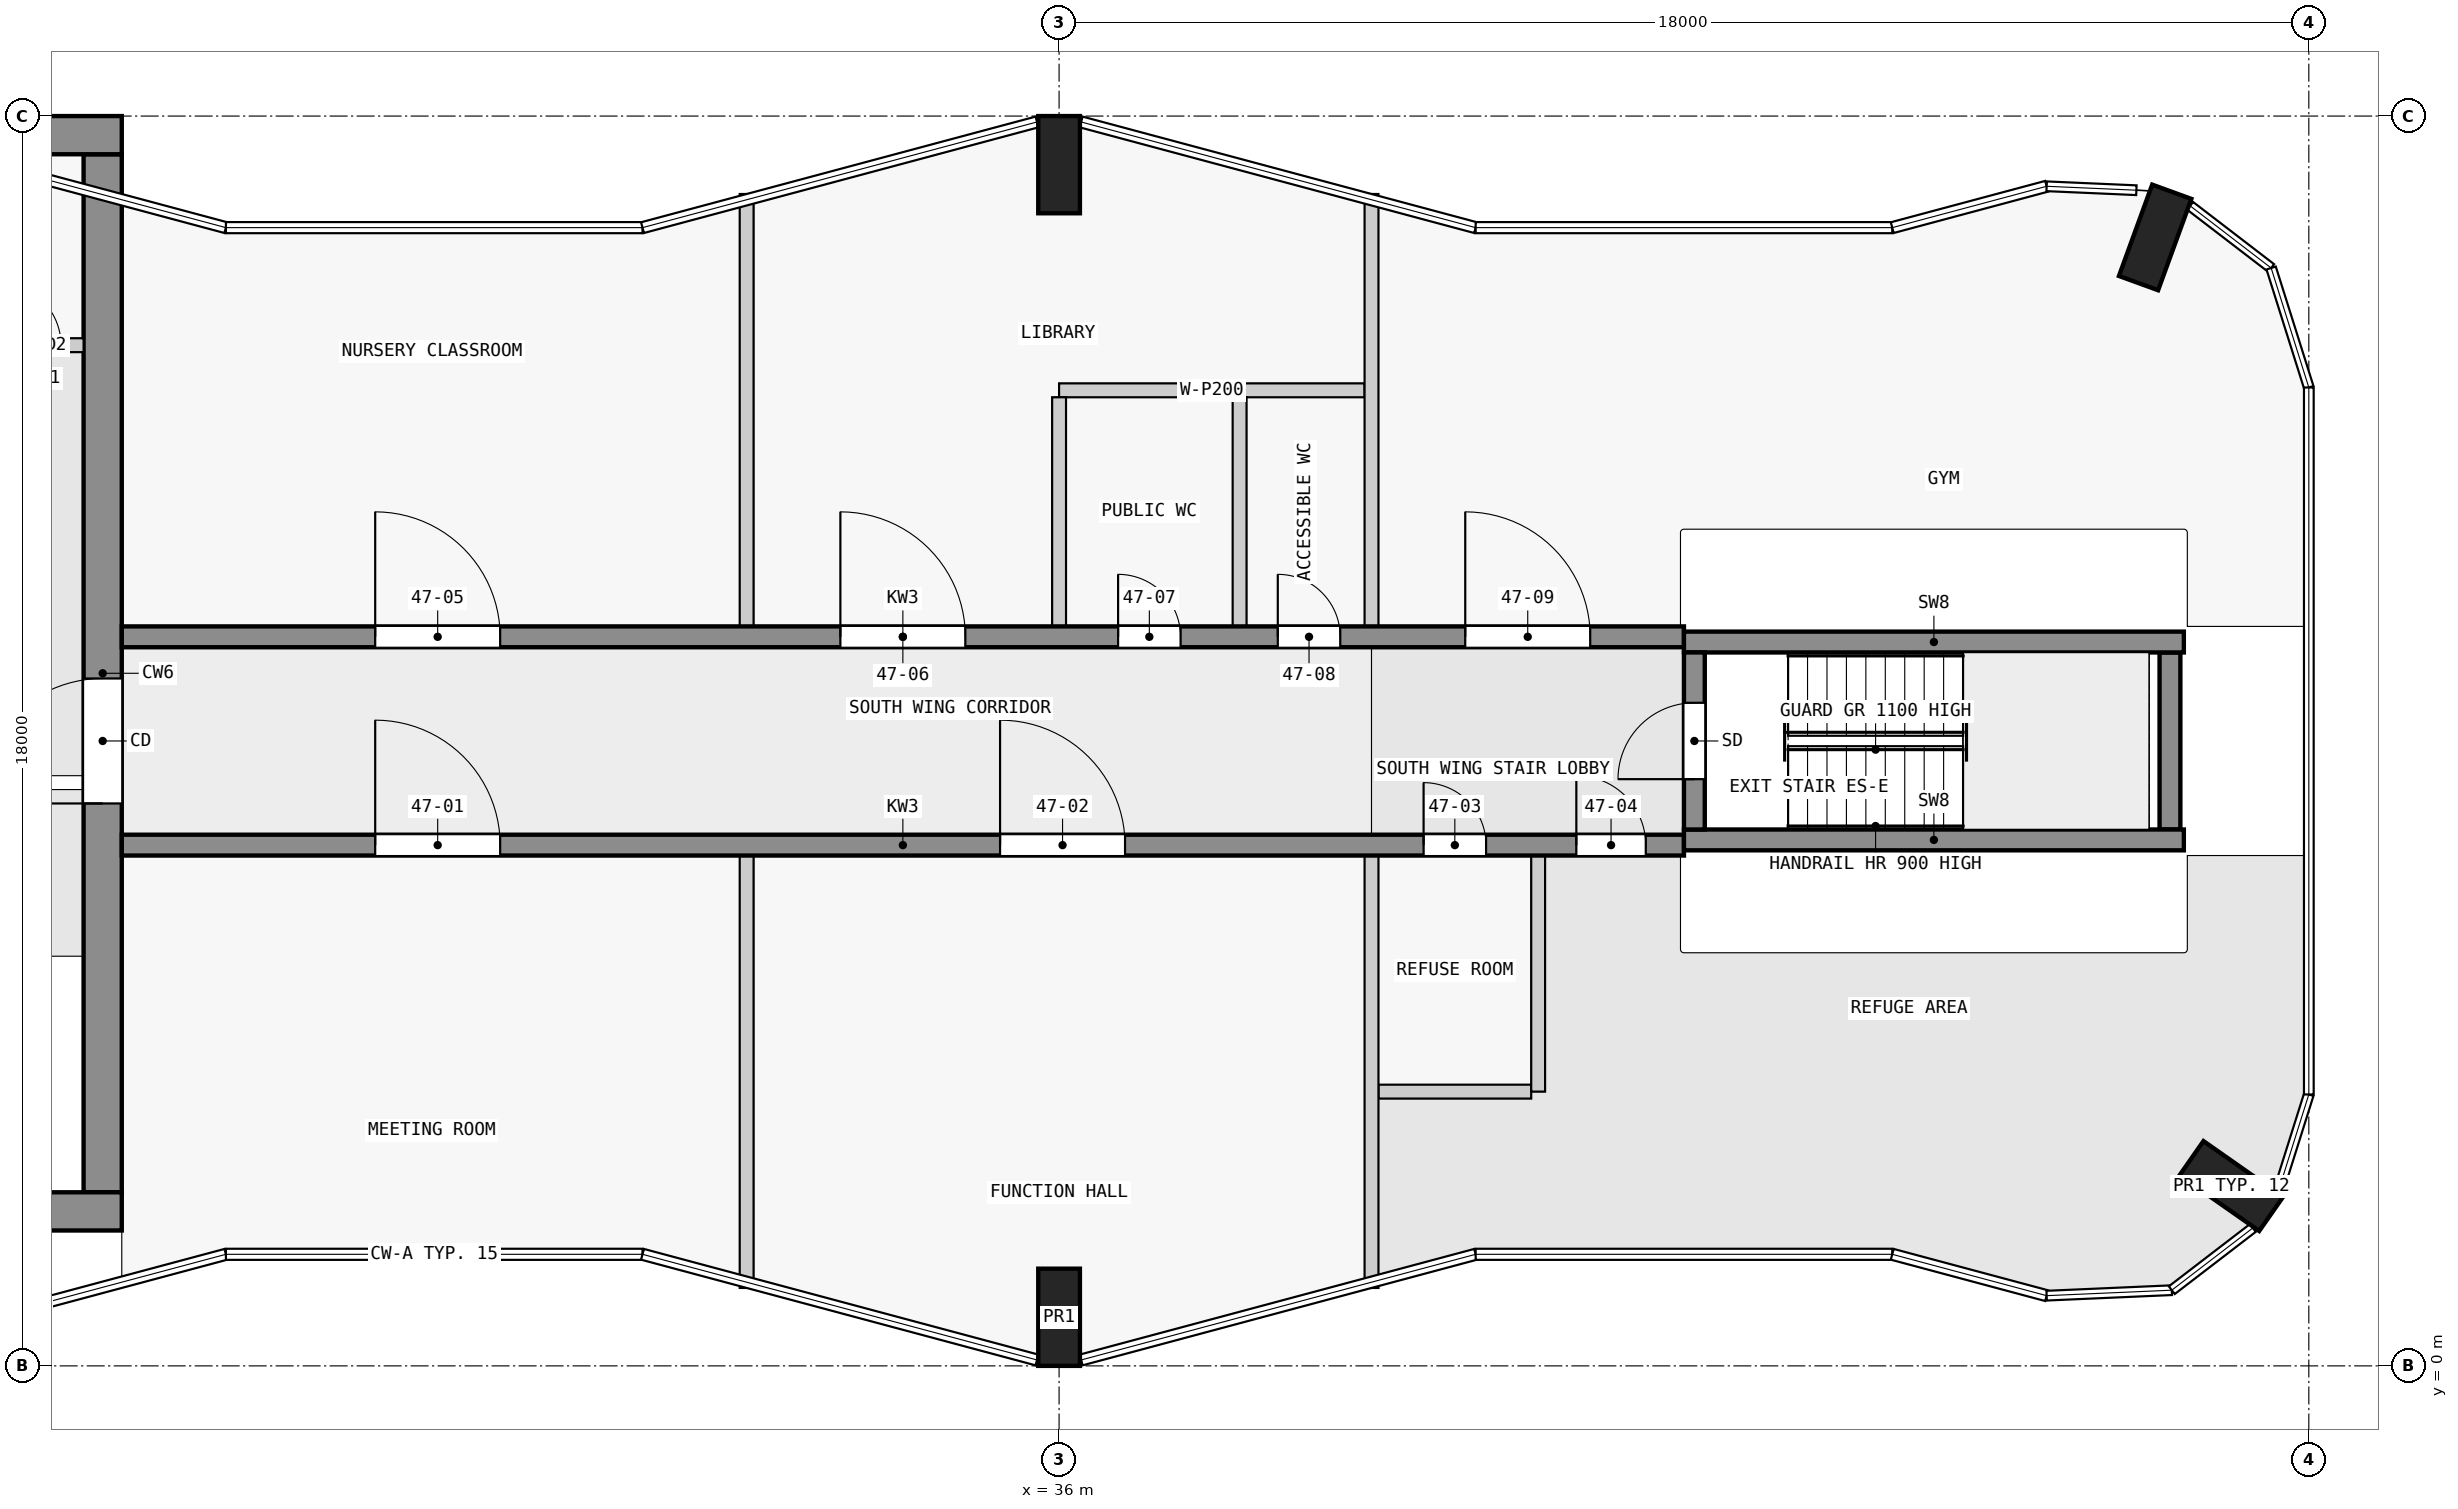
"""IFC4 building model, lengths in metres.
Left out: names, types, materials, properties, quantities, classifications, styles, units other than length and angle.
Written with IfcOpenShell. Run it as: python <this file> out.ifc"""

import sys

from ifc_helpers import new_model, si_unit, direction, frame, frame_2d, origin, origin_2d, place, context, subcontext, project, spatial, rectangle, extrude, element, fill, save


model = new_model("IFC4")
c1 = context("Model", 3, precision=1e-05, world=origin(), true_north=direction((0.0, 1.0)))
c2 = subcontext(c1, "Body", "Model", "MODEL_VIEW")
j1 = project(units=[si_unit("LENGTHUNIT", "METRE"), si_unit("PLANEANGLEUNIT", "RADIAN")], contexts=[c1])
p1 = place(None, origin())
s1 = spatial("IfcSite", under=j1, at=p1, CompositionType="ELEMENT")
p2 = place(p1, origin())
s2 = spatial("IfcBuilding", under=s1, at=p2, CompositionType="ELEMENT")
p3 = place(p2, frame((0.0, 0.0, 181.4)))
s3 = spatial("IfcBuildingStorey", under=s2, at=p3, CompositionType="ELEMENT", Elevation=181.4)
for number, where, z_axis, x_axis in (
    (1, (36.0, 0.7, 0.0), (0.0, 0.0, 1.0), (1.0, 0.0, 0.0)),
    (2, (52.884, 2.59, 0.0), (0.0, 0.0, 1.0), (0.574, 0.819, 0.0)),
    (3, (51.787, 16.252, 0.0), (0.0, 0.0, 1.0), (-0.94, 0.342, 0.0)),
    (4, (36.0, 17.3, 0.0), (0.0, 0.0, 1.0), (1.0, 0.0, 0.0)),
):
    element("IfcColumn", number, at=place(p3, frame(where, z_axis=z_axis, x_axis=x_axis)), inside=s3, PredefinedType="COLUMN", context=c2, shape_type="SweptSolid", body=[
        extrude(rectangle(XDim=0.6, YDim=1.4, at=origin_2d()), origin(), (0.0, 0.0, 1.0), 3.5),
    ])
p4 = place(p3, frame((1.75, 2.225, 0.0), z_axis=(0.0, 0.0, 1.0), x_axis=(1.0, 0.0, 0.0)))
e5 = element("IfcWall", 5, at=p4, inside=s3, PredefinedType="SHEAR", context=c2, shape_type="SweptSolid", body=[
    extrude(rectangle(XDim=20.75, YDim=0.55, at=frame_2d((10.375, 0.0))), origin(), (0.0, 0.0, 1.0), 3.2),
])
p5 = place(p3, frame((1.38, 17.725, 0.0), z_axis=(0.0, 0.0, 1.0), x_axis=(1.0, 0.0, 0.0)))
e6 = element("IfcWall", 6, at=p5, inside=s3, PredefinedType="SHEAR", context=c2, shape_type="SweptSolid", body=[
    extrude(rectangle(XDim=21.12, YDim=0.55, at=frame_2d((10.56, 0.0))), origin(), (0.0, 0.0, 1.0), 3.2),
])
p6 = place(p5, frame((6.35, 0.0, 0.0)))
e7 = element("IfcOpeningElement", 7, at=p6, cuts=e6, PredefinedType="OPENING", context=c2, shape_type="SweptSolid", body=[
    extrude(rectangle(XDim=1.8, YDim=2.1, at=frame_2d((0.9, 1.05))), frame((0.0, 0.285, 0.0), z_axis=(0.0, -1.0, 0.0), x_axis=(1.0, 0.0, 0.0)), (0.0, 0.0, 1.0), 0.57),
])
p7 = place(p3, frame((22.225, 2.5, 0.0), z_axis=(0.0, 0.0, 1.0), x_axis=(0.0, 1.0, 0.0)))
e8 = element("IfcWall", 8, at=p7, inside=s3, PredefinedType="SHEAR", context=c2, shape_type="SweptSolid", body=[
    extrude(rectangle(XDim=14.95, YDim=0.55, at=frame_2d((7.475, 0.0))), origin(), (0.0, 0.0, 1.0), 3.2),
])
p8 = place(p7, frame((5.6, 0.0, 0.0)))
e9 = element("IfcOpeningElement", 9, at=p8, cuts=e8, PredefinedType="OPENING", context=c2, shape_type="SweptSolid", body=[
    extrude(rectangle(XDim=1.8, YDim=2.1, at=frame_2d((0.9, 1.05))), frame((0.0, 0.285, 0.0), z_axis=(0.0, -1.0, 0.0), x_axis=(1.0, 0.0, 0.0)), (0.0, 0.0, 1.0), 0.57),
])
p9 = place(p3, frame((45.15, 7.725, 0.0), z_axis=(0.0, 0.0, 1.0), x_axis=(0.0, 1.0, 0.0)))
e10 = element("IfcWall", 10, at=p9, inside=s3, PredefinedType="SHEAR", context=c2, shape_type="SweptSolid", body=[
    extrude(rectangle(XDim=2.55, YDim=0.3, at=frame_2d((1.275, 0.0))), origin(), (0.0, 0.0, 1.0), 3.5),
])
p10 = place(p9, frame((0.725, 0.0, 0.0)))
e11 = element("IfcOpeningElement", 11, at=p10, cuts=e10, PredefinedType="OPENING", context=c2, shape_type="SweptSolid", body=[
    extrude(rectangle(XDim=1.1, YDim=2.1, at=frame_2d((0.55, 1.05))), frame((0.0, 0.16, 0.0), z_axis=(0.0, -1.0, 0.0), x_axis=(1.0, 0.0, 0.0)), (0.0, 0.0, 1.0), 0.32),
])
p11 = place(p3, frame((52.0, 7.725, 0.0), z_axis=(0.0, 0.0, 1.0), x_axis=(0.0, 1.0, 0.0)))
e12 = element("IfcWall", 12, at=p11, inside=s3, PredefinedType="SHEAR", context=c2, shape_type="SweptSolid", body=[
    extrude(rectangle(XDim=2.55, YDim=0.3, at=frame_2d((1.275, 0.0))), origin(), (0.0, 0.0, 1.0), 3.5),
])
for number, where, z_axis, x_axis in (
    (13, (45.0, 7.575, 0.0), (0.0, 0.0, 1.0), (1.0, 0.0, 0.0)),
    (14, (45.0, 10.425, 0.0), (0.0, 0.0, 1.0), (1.0, 0.0, 0.0)),
):
    element("IfcWall", number, at=place(p3, frame(where, z_axis=z_axis, x_axis=x_axis)), inside=s3, PredefinedType="SHEAR", context=c2, shape_type="SweptSolid", body=[
        extrude(rectangle(XDim=7.2, YDim=0.3, at=frame_2d((3.6, 0.0))), origin(), (0.0, 0.0, 1.0), 3.5),
    ])
p12 = place(p3, frame((22.5, 7.5, 0.0), z_axis=(0.0, 0.0, 1.0), x_axis=(1.0, 0.0, 0.0)))
e15 = element("IfcWall", 15, at=p12, inside=s3, PredefinedType="SHEAR", context=c2, shape_type="SweptSolid", body=[
    extrude(rectangle(XDim=22.5, YDim=0.3, at=frame_2d((11.25, 0.0))), origin(), (0.0, 0.0, 1.0), 3.2),
])
p13 = place(p12, frame((3.65, 0.0, 0.0)))
e16 = element("IfcOpeningElement", 16, at=p13, cuts=e15, PredefinedType="OPENING", context=c2, shape_type="SweptSolid", body=[
    extrude(rectangle(XDim=1.8, YDim=2.1, at=frame_2d((0.9, 1.05))), frame((0.0, 0.16, 0.0), z_axis=(0.0, -1.0, 0.0), x_axis=(1.0, 0.0, 0.0)), (0.0, 0.0, 1.0), 0.32),
])
p14 = place(p12, frame((12.65, 0.0, 0.0)))
e17 = element("IfcOpeningElement", 17, at=p14, cuts=e15, PredefinedType="OPENING", context=c2, shape_type="SweptSolid", body=[
    extrude(rectangle(XDim=1.8, YDim=2.1, at=frame_2d((0.9, 1.05))), frame((0.0, 0.16, 0.0), z_axis=(0.0, -1.0, 0.0), x_axis=(1.0, 0.0, 0.0)), (0.0, 0.0, 1.0), 0.32),
])
p15 = place(p12, frame((18.75, 0.0, 0.0)))
e18 = element("IfcOpeningElement", 18, at=p15, cuts=e15, PredefinedType="OPENING", context=c2, shape_type="SweptSolid", body=[
    extrude(rectangle(XDim=0.9, YDim=2.1, at=frame_2d((0.45, 1.05))), frame((0.0, 0.16, 0.0), z_axis=(0.0, -1.0, 0.0), x_axis=(1.0, 0.0, 0.0)), (0.0, 0.0, 1.0), 0.32),
])
p16 = place(p12, frame((20.95, 0.0, 0.0)))
e19 = element("IfcOpeningElement", 19, at=p16, cuts=e15, PredefinedType="OPENING", context=c2, shape_type="SweptSolid", body=[
    extrude(rectangle(XDim=1.0, YDim=2.1, at=frame_2d((0.5, 1.05))), frame((0.0, 0.16, 0.0), z_axis=(0.0, -1.0, 0.0), x_axis=(1.0, 0.0, 0.0)), (0.0, 0.0, 1.0), 0.32),
])
p17 = place(p3, frame((22.5, 10.5, 0.0), z_axis=(0.0, 0.0, 1.0), x_axis=(1.0, 0.0, 0.0)))
e20 = element("IfcWall", 20, at=p17, inside=s3, PredefinedType="SHEAR", context=c2, shape_type="SweptSolid", body=[
    extrude(rectangle(XDim=22.5, YDim=0.3, at=frame_2d((11.25, 0.0))), origin(), (0.0, 0.0, 1.0), 3.2),
])
p18 = place(p17, frame((3.65, 0.0, 0.0)))
e21 = element("IfcOpeningElement", 21, at=p18, cuts=e20, PredefinedType="OPENING", context=c2, shape_type="SweptSolid", body=[
    extrude(rectangle(XDim=1.8, YDim=2.1, at=frame_2d((0.9, 1.05))), frame((0.0, 0.16, 0.0), z_axis=(0.0, -1.0, 0.0), x_axis=(1.0, 0.0, 0.0)), (0.0, 0.0, 1.0), 0.32),
])
p19 = place(p17, frame((10.35, 0.0, 0.0)))
e22 = element("IfcOpeningElement", 22, at=p19, cuts=e20, PredefinedType="OPENING", context=c2, shape_type="SweptSolid", body=[
    extrude(rectangle(XDim=1.8, YDim=2.1, at=frame_2d((0.9, 1.05))), frame((0.0, 0.16, 0.0), z_axis=(0.0, -1.0, 0.0), x_axis=(1.0, 0.0, 0.0)), (0.0, 0.0, 1.0), 0.32),
])
p20 = place(p17, frame((14.35, 0.0, 0.0)))
e23 = element("IfcOpeningElement", 23, at=p20, cuts=e20, PredefinedType="OPENING", context=c2, shape_type="SweptSolid", body=[
    extrude(rectangle(XDim=0.9, YDim=2.1, at=frame_2d((0.45, 1.05))), frame((0.0, 0.16, 0.0), z_axis=(0.0, -1.0, 0.0), x_axis=(1.0, 0.0, 0.0)), (0.0, 0.0, 1.0), 0.32),
])
p21 = place(p17, frame((16.65, 0.0, 0.0)))
e24 = element("IfcOpeningElement", 24, at=p21, cuts=e20, PredefinedType="OPENING", context=c2, shape_type="SweptSolid", body=[
    extrude(rectangle(XDim=0.9, YDim=2.1, at=frame_2d((0.45, 1.05))), frame((0.0, 0.16, 0.0), z_axis=(0.0, -1.0, 0.0), x_axis=(1.0, 0.0, 0.0)), (0.0, 0.0, 1.0), 0.32),
])
p22 = place(p17, frame((19.35, 0.0, 0.0)))
e25 = element("IfcOpeningElement", 25, at=p22, cuts=e20, PredefinedType="OPENING", context=c2, shape_type="SweptSolid", body=[
    extrude(rectangle(XDim=1.8, YDim=2.1, at=frame_2d((0.9, 1.05))), frame((0.0, 0.16, 0.0), z_axis=(0.0, -1.0, 0.0), x_axis=(1.0, 0.0, 0.0)), (0.0, 0.0, 1.0), 0.32),
])
p23 = place(p3, frame((18.6, 14.7, 0.0), z_axis=(0.0, 0.0, 1.0), x_axis=(1.0, 0.0, 0.0)))
e26 = element("IfcWall", 26, at=p23, inside=s3, PredefinedType="PARTITIONING", context=c2, shape_type="SweptSolid", body=[
    extrude(rectangle(XDim=3.35, YDim=0.2, at=frame_2d((1.675, 0.0))), origin(), (0.0, 0.0, 1.0), 3.2),
])
p24 = place(p23, frame((0.45, 0.0, 0.0)))
e27 = element("IfcOpeningElement", 27, at=p24, cuts=e26, PredefinedType="OPENING", context=c2, shape_type="SweptSolid", body=[
    extrude(rectangle(XDim=0.9, YDim=2.1, at=frame_2d((0.45, 1.05))), frame((0.0, 0.11, 0.0), z_axis=(0.0, -1.0, 0.0), x_axis=(1.0, 0.0, 0.0)), (0.0, 0.0, 1.0), 0.22),
])
p25 = place(p23, frame((2.125, 0.0, 0.0)))
e28 = element("IfcOpeningElement", 28, at=p25, cuts=e26, PredefinedType="OPENING", context=c2, shape_type="SweptSolid", body=[
    extrude(rectangle(XDim=0.9, YDim=2.1, at=frame_2d((0.45, 1.05))), frame((0.0, 0.11, 0.0), z_axis=(0.0, -1.0, 0.0), x_axis=(1.0, 0.0, 0.0)), (0.0, 0.0, 1.0), 0.22),
])
p26 = place(p3, frame((40.6, 3.95, 0.0), z_axis=(0.0, 0.0, 1.0), x_axis=(1.0, 0.0, 0.0)))
e29 = element("IfcWall", 29, at=p26, inside=s3, PredefinedType="PARTITIONING", context=c2, shape_type="SweptSolid", body=[
    extrude(rectangle(XDim=2.2, YDim=0.2, at=frame_2d((1.1, 0.0))), origin(), (0.0, 0.0, 1.0), 3.2),
])
p27 = place(p3, frame((36.0, 14.05, 0.0), z_axis=(0.0, 0.0, 1.0), x_axis=(1.0, 0.0, 0.0)))
e30 = element("IfcWall", 30, at=p27, inside=s3, PredefinedType="PARTITIONING", context=c2, shape_type="SweptSolid", body=[
    extrude(rectangle(XDim=4.4, YDim=0.2, at=frame_2d((2.2, 0.0))), origin(), (0.0, 0.0, 1.0), 3.2),
])
for number, where, z_axis, x_axis in (
    (31, (31.5, 1.122, 0.0), (0.0, 0.0, 1.0), (0.0, 1.0, 0.0)),
    (32, (31.5, 10.65, 0.0), (0.0, 0.0, 1.0), (0.0, 1.0, 0.0)),
):
    element("IfcWall", number, at=place(p3, frame(where, z_axis=z_axis, x_axis=x_axis)), inside=s3, PredefinedType="PARTITIONING", context=c2, shape_type="SweptSolid", body=[
        extrude(rectangle(XDim=6.228, YDim=0.2, at=frame_2d((3.114, 0.0))), origin(), (0.0, 0.0, 1.0), 3.2),
    ])
for number, where, z_axis, x_axis in (
    (33, (36.0, 10.65, 0.0), (0.0, 0.0, 1.0), (0.0, 1.0, 0.0)),
    (34, (38.6, 10.65, 0.0), (0.0, 0.0, 1.0), (0.0, 1.0, 0.0)),
):
    element("IfcWall", number, at=place(p3, frame(where, z_axis=z_axis, x_axis=x_axis)), inside=s3, PredefinedType="PARTITIONING", context=c2, shape_type="SweptSolid", body=[
        extrude(rectangle(XDim=3.3, YDim=0.2, at=frame_2d((1.65, 0.0))), origin(), (0.0, 0.0, 1.0), 3.2),
    ])
for number, where, z_axis, x_axis in (
    (35, (40.5, 1.122, 0.0), (0.0, 0.0, 1.0), (0.0, 1.0, 0.0)),
    (36, (40.5, 10.65, 0.0), (0.0, 0.0, 1.0), (0.0, 1.0, 0.0)),
):
    element("IfcWall", number, at=place(p3, frame(where, z_axis=z_axis, x_axis=x_axis)), inside=s3, PredefinedType="PARTITIONING", context=c2, shape_type="SweptSolid", body=[
        extrude(rectangle(XDim=6.228, YDim=0.2, at=frame_2d((3.114, 0.0))), origin(), (0.0, 0.0, 1.0), 3.2),
    ])
p28 = place(p3, frame((42.9, 3.95, 0.0), z_axis=(0.0, 0.0, 1.0), x_axis=(0.0, 1.0, 0.0)))
e37 = element("IfcWall", 37, at=p28, inside=s3, PredefinedType="PARTITIONING", context=c2, shape_type="SweptSolid", body=[
    extrude(rectangle(XDim=3.4, YDim=0.2, at=frame_2d((1.7, 0.0))), origin(), (0.0, 0.0, 1.0), 3.2),
])
p29 = place(p8, origin())
e38 = element("IfcDoor", 38, at=p29, inside=s3, OperationType="DOUBLE_DOOR_SINGLE_SWING", PredefinedType="DOOR", context=c2, shape_type="SweptSolid", body=[
    extrude(rectangle(XDim=1.8, YDim=2.1, at=frame_2d((0.9, 1.05))), frame((0.0, 0.025, 0.0), z_axis=(0.0, -1.0, 0.0), x_axis=(1.0, 0.0, 0.0)), (0.0, 0.0, 1.0), 0.05),
])
fill(e9, e38)
p30 = place(p25, origin())
e39 = element("IfcDoor", 39, at=p30, inside=s3, OperationType="SINGLE_SWING_LEFT", PredefinedType="DOOR", context=c2, shape_type="SweptSolid", body=[
    extrude(rectangle(XDim=0.9, YDim=2.1, at=frame_2d((0.45, 1.05))), frame((0.0, 0.025, 0.0), z_axis=(0.0, -1.0, 0.0), x_axis=(1.0, 0.0, 0.0)), (0.0, 0.0, 1.0), 0.05),
])
fill(e28, e39)
p31 = place(p10, origin())
e40 = element("IfcDoor", 40, at=p31, inside=s3, OperationType="SINGLE_SWING_LEFT", PredefinedType="DOOR", context=c2, shape_type="SweptSolid", body=[
    extrude(rectangle(XDim=1.1, YDim=2.1, at=frame_2d((0.55, 1.05))), frame((0.0, 0.025, 0.0), z_axis=(0.0, -1.0, 0.0), x_axis=(1.0, 0.0, 0.0)), (0.0, 0.0, 1.0), 0.05),
])
fill(e11, e40)
p32 = place(p13, origin())
e41 = element("IfcDoor", 41, at=p32, inside=s3, OperationType="SINGLE_SWING_LEFT", PredefinedType="DOOR", context=c2, shape_type="SweptSolid", body=[
    extrude(rectangle(XDim=1.8, YDim=2.1, at=frame_2d((0.9, 1.05))), frame((0.0, 0.025, 0.0), z_axis=(0.0, -1.0, 0.0), x_axis=(1.0, 0.0, 0.0)), (0.0, 0.0, 1.0), 0.05),
])
fill(e16, e41)
p33 = place(p14, origin())
e42 = element("IfcDoor", 42, at=p33, inside=s3, OperationType="SINGLE_SWING_RIGHT", PredefinedType="DOOR", context=c2, shape_type="SweptSolid", body=[
    extrude(rectangle(XDim=1.8, YDim=2.1, at=frame_2d((0.9, 1.05))), frame((0.0, 0.025, 0.0), z_axis=(0.0, -1.0, 0.0), x_axis=(1.0, 0.0, 0.0)), (0.0, 0.0, 1.0), 0.05),
])
fill(e17, e42)
p34 = place(p15, origin())
e43 = element("IfcDoor", 43, at=p34, inside=s3, OperationType="SINGLE_SWING_RIGHT", PredefinedType="DOOR", context=c2, shape_type="SweptSolid", body=[
    extrude(rectangle(XDim=0.9, YDim=2.1, at=frame_2d((0.45, 1.05))), frame((0.0, 0.025, 0.0), z_axis=(0.0, -1.0, 0.0), x_axis=(1.0, 0.0, 0.0)), (0.0, 0.0, 1.0), 0.05),
])
fill(e18, e43)
p35 = place(p16, origin())
e44 = element("IfcDoor", 44, at=p35, inside=s3, OperationType="SINGLE_SWING_RIGHT", PredefinedType="DOOR", context=c2, shape_type="SweptSolid", body=[
    extrude(rectangle(XDim=1.0, YDim=2.1, at=frame_2d((0.5, 1.05))), frame((0.0, 0.025, 0.0), z_axis=(0.0, -1.0, 0.0), x_axis=(1.0, 0.0, 0.0)), (0.0, 0.0, 1.0), 0.05),
])
fill(e19, e44)
p36 = place(p18, origin())
e45 = element("IfcDoor", 45, at=p36, inside=s3, OperationType="SINGLE_SWING_LEFT", PredefinedType="DOOR", context=c2, shape_type="SweptSolid", body=[
    extrude(rectangle(XDim=1.8, YDim=2.1, at=frame_2d((0.9, 1.05))), frame((0.0, 0.025, 0.0), z_axis=(0.0, -1.0, 0.0), x_axis=(1.0, 0.0, 0.0)), (0.0, 0.0, 1.0), 0.05),
])
fill(e21, e45)
p37 = place(p19, origin())
e46 = element("IfcDoor", 46, at=p37, inside=s3, OperationType="SINGLE_SWING_LEFT", PredefinedType="DOOR", context=c2, shape_type="SweptSolid", body=[
    extrude(rectangle(XDim=1.8, YDim=2.1, at=frame_2d((0.9, 1.05))), frame((0.0, 0.025, 0.0), z_axis=(0.0, -1.0, 0.0), x_axis=(1.0, 0.0, 0.0)), (0.0, 0.0, 1.0), 0.05),
])
fill(e22, e46)
p38 = place(p20, origin())
e47 = element("IfcDoor", 47, at=p38, inside=s3, OperationType="SINGLE_SWING_RIGHT", PredefinedType="DOOR", context=c2, shape_type="SweptSolid", body=[
    extrude(rectangle(XDim=0.9, YDim=2.1, at=frame_2d((0.45, 1.05))), frame((0.0, 0.025, 0.0), z_axis=(0.0, -1.0, 0.0), x_axis=(1.0, 0.0, 0.0)), (0.0, 0.0, 1.0), 0.05),
])
fill(e23, e47)
p39 = place(p21, origin())
e48 = element("IfcDoor", 48, at=p39, inside=s3, OperationType="SINGLE_SWING_RIGHT", PredefinedType="DOOR", context=c2, shape_type="SweptSolid", body=[
    extrude(rectangle(XDim=0.9, YDim=2.1, at=frame_2d((0.45, 1.05))), frame((0.0, 0.025, 0.0), z_axis=(0.0, -1.0, 0.0), x_axis=(1.0, 0.0, 0.0)), (0.0, 0.0, 1.0), 0.05),
])
fill(e24, e48)
p40 = place(p22, origin())
e49 = element("IfcDoor", 49, at=p40, inside=s3, OperationType="SINGLE_SWING_RIGHT", PredefinedType="DOOR", context=c2, shape_type="SweptSolid", body=[
    extrude(rectangle(XDim=1.8, YDim=2.1, at=frame_2d((0.9, 1.05))), frame((0.0, 0.025, 0.0), z_axis=(0.0, -1.0, 0.0), x_axis=(1.0, 0.0, 0.0)), (0.0, 0.0, 1.0), 0.05),
])
fill(e25, e49)
save(model, sys.argv[1])
